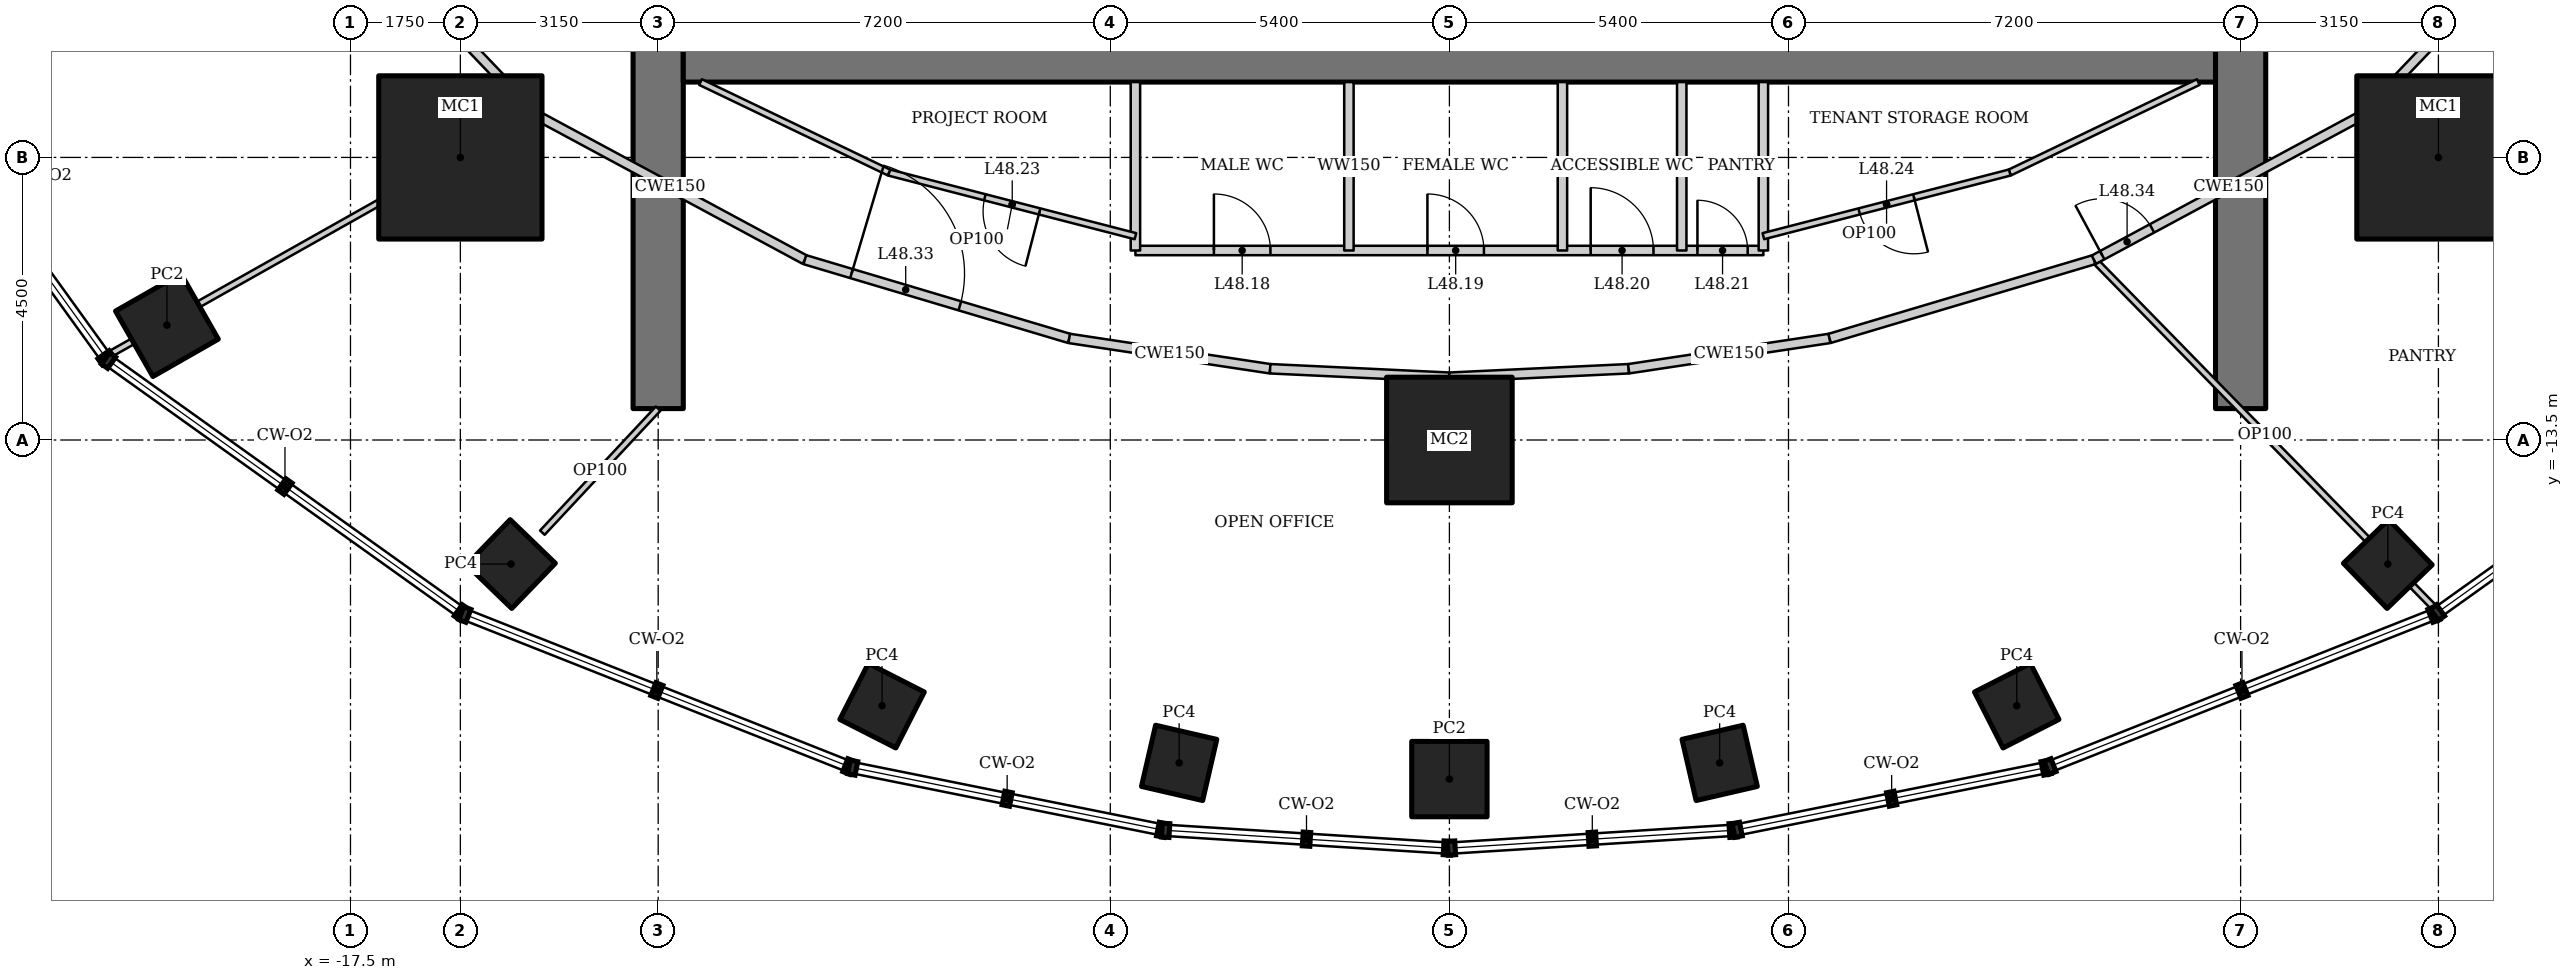
"""IFC4 building model, lengths in metres.
Left out: names, types, materials, properties, quantities, classifications, styles, units other than length and angle.
Written with IfcOpenShell. Run it as: python <this file> out.ifc"""

import sys

from ifc_helpers import new_model, si_unit, direction, frame, frame_2d, origin, origin_2d, place, context, subcontext, project, spatial, rectangle, hollow_rectangle, extrude, element, fill, save


model = new_model("IFC4")
c1 = context("Model", 3, precision=1e-05, world=origin(), true_north=direction((0.0, 1.0)))
c2 = subcontext(c1, "Body", "Model", "MODEL_VIEW")
j1 = project(units=[si_unit("LENGTHUNIT", "METRE"), si_unit("PLANEANGLEUNIT", "RADIAN")], contexts=[c1])
p1 = place(None, origin())
s1 = spatial("IfcSite", under=j1, at=p1, CompositionType="ELEMENT")
p2 = place(p1, origin())
s2 = spatial("IfcBuilding", under=s1, at=p2, CompositionType="ELEMENT")
p3 = place(p2, frame((0.0, 0.0, 207.4)))
s3 = spatial("IfcBuildingStorey", under=s2, at=p3, CompositionType="ELEMENT", Elevation=207.4)
p4 = place(p3, frame((-15.75, -9.0, 0.0), z_axis=(0.0, 0.0, 1.0), x_axis=(1.0, 0.0, 0.0)))
e1 = element("IfcColumn", 1, at=p4, inside=s3, PredefinedType="COLUMN", context=c2, shape_type="SweptSolid", body=[
    extrude(hollow_rectangle(XDim=2.6, YDim=2.6, WallThickness=0.13, at=origin_2d()), origin(), (0.0, 0.0, 1.0), 4.2),
])
p5 = place(p3, frame((0.0, -13.5, 0.0), z_axis=(0.0, 0.0, 1.0), x_axis=(1.0, 0.0, 0.0)))
e2 = element("IfcColumn", 2, at=p5, inside=s3, PredefinedType="COLUMN", context=c2, shape_type="SweptSolid", body=[
    extrude(hollow_rectangle(XDim=2.0, YDim=2.0, WallThickness=0.17, at=origin_2d()), origin(), (0.0, 0.0, 1.0), 4.2),
])
p6 = place(p3, frame((15.75, -9.0, 0.0), z_axis=(0.0, 0.0, 1.0), x_axis=(1.0, 0.0, 0.0)))
e3 = element("IfcColumn", 3, at=p6, inside=s3, PredefinedType="COLUMN", context=c2, shape_type="SweptSolid", body=[
    extrude(hollow_rectangle(XDim=2.6, YDim=2.6, WallThickness=0.13, at=origin_2d()), origin(), (0.0, 0.0, 1.0), 4.2),
])
p7 = place(p3, frame((-20.423, -11.67, 0.0), z_axis=(0.0, 0.0, 1.0), x_axis=(0.86824298017, 0.496139221777, 0.0)))
e4 = element("IfcColumn", 4, at=p7, inside=s3, PredefinedType="COLUMN", context=c2, shape_type="SweptSolid", body=[
    extrude(hollow_rectangle(XDim=1.2, YDim=1.2, WallThickness=0.1, at=origin_2d()), origin(), (0.0, 0.0, 1.0), 4.2),
])
for number, where, z_axis, x_axis in (
    (5, (-14.944, -15.475, 0.0), (0.0, 0.0, 1.0), (0.695, 0.719, 0.0)),
    (6, (-9.035, -17.731, 0.0), (0.0, 0.0, 1.0), (0.454, 0.891, 0.0)),
    (7, (-4.304, -18.642, 0.0), (0.0, 0.0, 1.0), (0.225, 0.974, 0.0)),
):
    element("IfcColumn", number, at=place(p3, frame(where, z_axis=z_axis, x_axis=x_axis)), inside=s3, PredefinedType="COLUMN", context=c2, shape_type="SweptSolid", body=[
        extrude(hollow_rectangle(XDim=1.0, YDim=1.0, WallThickness=0.08, at=origin_2d()), origin(), (0.0, 0.0, 1.0), 4.2),
    ])
p8 = place(p3, frame((0.0, -18.9, 0.0), z_axis=(0.0, 0.0, 1.0), x_axis=(1.0, 0.0, 0.0)))
e8 = element("IfcColumn", 8, at=p8, inside=s3, PredefinedType="COLUMN", context=c2, shape_type="SweptSolid", body=[
    extrude(hollow_rectangle(XDim=1.2, YDim=1.2, WallThickness=0.1, at=origin_2d()), origin(), (0.0, 0.0, 1.0), 4.2),
])
for number, where, z_axis, x_axis in (
    (9, (4.304, -18.642, 0.0), (0.0, 0.0, 1.0), (0.974, 0.225, 0.0)),
    (10, (9.035, -17.731, 0.0), (0.0, 0.0, 1.0), (0.891, 0.454, 0.0)),
    (11, (14.944, -15.475, 0.0), (0.0, 0.0, 1.0), (0.719, 0.695, 0.0)),
):
    element("IfcColumn", number, at=place(p3, frame(where, z_axis=z_axis, x_axis=x_axis)), inside=s3, PredefinedType="COLUMN", context=c2, shape_type="SweptSolid", body=[
        extrude(hollow_rectangle(XDim=1.0, YDim=1.0, WallThickness=0.08, at=origin_2d()), origin(), (0.0, 0.0, 1.0), 4.2),
    ])
p9 = place(p3, frame((12.6, -13.0, 0.0), z_axis=(0.0, 0.0, 1.0), x_axis=(0.0, 1.0, 0.0)))
e12 = element("IfcWall", 12, at=p9, inside=s3, PredefinedType="SHEAR", context=c2, shape_type="SweptSolid", body=[
    extrude(rectangle(XDim=26.0, YDim=0.8, at=frame_2d((13.0, 0.0))), origin(), (0.0, 0.0, 1.0), 4.2),
])
p10 = place(p9, frame((12.1, 0.0, 0.0)))
e13 = element("IfcOpeningElement", 13, at=p10, cuts=e12, PredefinedType="OPENING", context=c2, shape_type="SweptSolid", body=[
    extrude(rectangle(XDim=1.8, YDim=2.1, at=frame_2d((0.9, 1.05))), frame((0.0, 0.41, 0.0), z_axis=(0.0, -1.0, 0.0), x_axis=(1.0, 0.0, 0.0)), (0.0, 0.0, 1.0), 0.82),
])
p11 = place(p3, frame((-12.6, 13.0, 0.0), z_axis=(0.0, 0.0, 1.0), x_axis=(0.0, -1.0, 0.0)))
e14 = element("IfcWall", 14, at=p11, inside=s3, PredefinedType="SHEAR", context=c2, shape_type="SweptSolid", body=[
    extrude(rectangle(XDim=26.0, YDim=0.8, at=frame_2d((13.0, 0.0))), origin(), (0.0, 0.0, 1.0), 4.2),
])
p12 = place(p11, frame((12.1, 0.0, 0.0)))
e15 = element("IfcOpeningElement", 15, at=p12, cuts=e14, PredefinedType="OPENING", context=c2, shape_type="SweptSolid", body=[
    extrude(rectangle(XDim=1.8, YDim=2.1, at=frame_2d((0.9, 1.05))), frame((0.0, 0.41, 0.0), z_axis=(0.0, -1.0, 0.0), x_axis=(1.0, 0.0, 0.0)), (0.0, 0.0, 1.0), 0.82),
])
p13 = place(p3, frame((-12.2, -7.3, 0.0), z_axis=(0.0, 0.0, 1.0), x_axis=(1.0, 0.0, 0.0)))
e16 = element("IfcWall", 16, at=p13, inside=s3, PredefinedType="SHEAR", context=c2, shape_type="SweptSolid", body=[
    extrude(rectangle(XDim=24.4, YDim=1.0, at=frame_2d((12.2, 0.0))), origin(), (0.0, 0.0, 1.0), 4.2),
])
p14 = place(p3, frame((-21.358, -12.15, 0.0), z_axis=(0.0, 0.0, 1.0), x_axis=(0.871273053995, 0.490798599614, 0.0)))
e17 = element("IfcWall", 17, at=p14, inside=s3, PredefinedType="PARTITIONING", context=c2, shape_type="SweptSolid", body=[
    extrude(rectangle(XDim=7.807, YDim=0.1, at=frame_2d((3.904, 0.0))), origin(), (0.0, 0.0, 1.0), 3.524),
])
p15 = place(p3, frame((15.709, -16.199, 0.0), z_axis=(0.0, 0.0, 1.0), x_axis=(-0.699053895446, 0.715068983569, 0.0)))
e18 = element("IfcWall", 18, at=p15, inside=s3, PredefinedType="PARTITIONING", context=c2, shape_type="SweptSolid", body=[
    extrude(rectangle(XDim=7.79, YDim=0.1, at=frame_2d((3.895, 0.0))), origin(), (0.0, 0.0, 1.0), 3.41),
])
p16 = place(p3, frame((21.358, -12.15, 0.0), z_axis=(0.0, 0.0, 1.0), x_axis=(-0.871273053995, 0.490798599614, 0.0)))
e19 = element("IfcWall", 19, at=p16, inside=s3, PredefinedType="PARTITIONING", context=c2, shape_type="SweptSolid", body=[
    extrude(rectangle(XDim=7.807, YDim=0.1, at=frame_2d((3.904, 0.0))), origin(), (0.0, 0.0, 1.0), 3.522),
])
p17 = place(p3, frame((-18.174, -4.531, 0.0), z_axis=(0.0, 0.0, 1.0), x_axis=(0.690768413292, -0.723076067366, 0.0)))
e20 = element("IfcWall", 20, at=p17, inside=s3, PredefinedType="PARTITIONING", context=c2, shape_type="SweptSolid", body=[
    extrude(rectangle(XDim=5.237, YDim=0.15, at=frame_2d((2.618, 0.0))), origin(), (0.0, 0.0, 1.0), 4.05),
])
p18 = place(p17, frame((0.1, 0.0, 0.0)))
e21 = element("IfcOpeningElement", 21, at=p18, cuts=e20, PredefinedType="OPENING", context=c2, shape_type="SweptSolid", body=[
    extrude(rectangle(XDim=1.8, YDim=2.1, at=frame_2d((0.9, 1.05))), frame((0.0, 0.085, 0.0), z_axis=(0.0, -1.0, 0.0), x_axis=(1.0, 0.0, 0.0)), (0.0, 0.0, 1.0), 0.17),
])
p19 = place(p3, frame((-14.556, -8.318, 0.0), z_axis=(0.0, 0.0, 1.0), x_axis=(0.88053863253, -0.47397438393, 0.0)))
e22 = element("IfcWall", 22, at=p19, inside=s3, PredefinedType="PARTITIONING", context=c2, shape_type="SweptSolid", body=[
    extrude(rectangle(XDim=4.875, YDim=0.15, at=frame_2d((2.438, 0.0))), origin(), (0.0, 0.0, 1.0), 4.05),
])
p20 = place(p3, frame((-10.264, -10.628, 0.0), z_axis=(0.0, 0.0, 1.0), x_axis=(0.958384389306, -0.285480931648, 0.0)))
e23 = element("IfcWall", 23, at=p20, inside=s3, PredefinedType="PARTITIONING", context=c2, shape_type="SweptSolid", body=[
    extrude(rectangle(XDim=4.392, YDim=0.15, at=frame_2d((2.196, 0.0))), origin(), (0.0, 0.0, 1.0), 4.05),
])
p21 = place(p20, frame((0.775, 0.0, 0.0)))
e24 = element("IfcOpeningElement", 24, at=p21, cuts=e23, PredefinedType="OPENING", context=c2, shape_type="SweptSolid", body=[
    extrude(rectangle(XDim=1.8, YDim=2.1, at=frame_2d((0.9, 1.05))), frame((0.0, 0.085, 0.0), z_axis=(0.0, -1.0, 0.0), x_axis=(1.0, 0.0, 0.0)), (0.0, 0.0, 1.0), 0.17),
])
p22 = place(p3, frame((-6.054, -11.882, 0.0), z_axis=(0.0, 0.0, 1.0), x_axis=(0.988800347251, -0.149244340852, 0.0)))
e25 = element("IfcWall", 25, at=p22, inside=s3, PredefinedType="PARTITIONING", context=c2, shape_type="SweptSolid", body=[
    extrude(rectangle(XDim=3.236, YDim=0.15, at=frame_2d((1.618, 0.0))), origin(), (0.0, 0.0, 1.0), 4.05),
])
for number, where, z_axis, x_axis in (
    (26, (-2.855, -12.365, 0.0), (0.0, 0.0, 1.0), (0.999, -0.047, 0.0)),
    (27, (0.0, -12.5, 0.0), (0.0, 0.0, 1.0), (0.999, 0.047, 0.0)),
):
    element("IfcWall", number, at=place(p3, frame(where, z_axis=z_axis, x_axis=x_axis)), inside=s3, PredefinedType="PARTITIONING", context=c2, shape_type="SweptSolid", body=[
        extrude(rectangle(XDim=2.858, YDim=0.15, at=frame_2d((1.429, 0.0))), origin(), (0.0, 0.0, 1.0), 4.05),
    ])
p23 = place(p3, frame((2.855, -12.365, 0.0), z_axis=(0.0, 0.0, 1.0), x_axis=(0.988800347251, 0.149244340852, 0.0)))
e28 = element("IfcWall", 28, at=p23, inside=s3, PredefinedType="PARTITIONING", context=c2, shape_type="SweptSolid", body=[
    extrude(rectangle(XDim=3.236, YDim=0.15, at=frame_2d((1.618, 0.0))), origin(), (0.0, 0.0, 1.0), 4.05),
])
p24 = place(p3, frame((6.054, -11.882, 0.0), z_axis=(0.0, 0.0, 1.0), x_axis=(0.958384389306, 0.285480931648, 0.0)))
e29 = element("IfcWall", 29, at=p24, inside=s3, PredefinedType="PARTITIONING", context=c2, shape_type="SweptSolid", body=[
    extrude(rectangle(XDim=4.392, YDim=0.15, at=frame_2d((2.196, 0.0))), origin(), (0.0, 0.0, 1.0), 4.05),
])
p25 = place(p3, frame((10.264, -10.628, 0.0), z_axis=(0.0, 0.0, 1.0), x_axis=(0.88053863253, 0.47397438393, 0.0)))
e30 = element("IfcWall", 30, at=p25, inside=s3, PredefinedType="PARTITIONING", context=c2, shape_type="SweptSolid", body=[
    extrude(rectangle(XDim=4.875, YDim=0.15, at=frame_2d((2.438, 0.0))), origin(), (0.0, 0.0, 1.0), 4.05),
])
p26 = place(p25, frame((0.15, 0.0, 0.0)))
e31 = element("IfcOpeningElement", 31, at=p26, cuts=e30, PredefinedType="OPENING", context=c2, shape_type="SweptSolid", body=[
    extrude(rectangle(XDim=0.9, YDim=2.1, at=frame_2d((0.45, 1.05))), frame((0.0, 0.085, 0.0), z_axis=(0.0, -1.0, 0.0), x_axis=(1.0, 0.0, 0.0)), (0.0, 0.0, 1.0), 0.17),
])
p27 = place(p3, frame((14.556, -8.318, 0.0), z_axis=(0.0, 0.0, 1.0), x_axis=(0.690768413292, 0.723076067366, 0.0)))
e32 = element("IfcWall", 32, at=p27, inside=s3, PredefinedType="PARTITIONING", context=c2, shape_type="SweptSolid", body=[
    extrude(rectangle(XDim=5.237, YDim=0.15, at=frame_2d((2.618, 0.0))), origin(), (0.0, 0.0, 1.0), 4.05),
])
p28 = place(p27, frame((4.187, 0.0, 0.0)))
e33 = element("IfcOpeningElement", 33, at=p28, cuts=e32, PredefinedType="OPENING", context=c2, shape_type="SweptSolid", body=[
    extrude(rectangle(XDim=0.9, YDim=2.1, at=frame_2d((0.45, 1.05))), frame((0.0, 0.085, 0.0), z_axis=(0.0, -1.0, 0.0), x_axis=(1.0, 0.0, 0.0)), (0.0, 0.0, 1.0), 0.17),
])
p29 = place(p3, frame((-5.0, -10.482, 0.0), z_axis=(0.0, 0.0, 1.0), x_axis=(1.0, 0.0, 0.0)))
e34 = element("IfcWall", 34, at=p29, inside=s3, PredefinedType="SOLIDWALL", context=c2, shape_type="SweptSolid", body=[
    extrude(rectangle(XDim=10.0, YDim=0.15, at=frame_2d((5.0, 0.0))), origin(), (0.0, 0.0, 1.0), 4.05),
])
p30 = place(p29, frame((1.25, 0.0, 0.0)))
e35 = element("IfcOpeningElement", 35, at=p30, cuts=e34, PredefinedType="OPENING", context=c2, shape_type="SweptSolid", body=[
    extrude(rectangle(XDim=0.9, YDim=2.1, at=frame_2d((0.45, 1.05))), frame((0.0, 0.085, 0.0), z_axis=(0.0, -1.0, 0.0), x_axis=(1.0, 0.0, 0.0)), (0.0, 0.0, 1.0), 0.17),
])
p31 = place(p29, frame((4.65, 0.0, 0.0)))
e36 = element("IfcOpeningElement", 36, at=p31, cuts=e34, PredefinedType="OPENING", context=c2, shape_type="SweptSolid", body=[
    extrude(rectangle(XDim=0.9, YDim=2.1, at=frame_2d((0.45, 1.05))), frame((0.0, 0.085, 0.0), z_axis=(0.0, -1.0, 0.0), x_axis=(1.0, 0.0, 0.0)), (0.0, 0.0, 1.0), 0.17),
])
p32 = place(p29, frame((7.25, 0.0, 0.0)))
e37 = element("IfcOpeningElement", 37, at=p32, cuts=e34, PredefinedType="OPENING", context=c2, shape_type="SweptSolid", body=[
    extrude(rectangle(XDim=1.0, YDim=2.1, at=frame_2d((0.5, 1.05))), frame((0.0, 0.085, 0.0), z_axis=(0.0, -1.0, 0.0), x_axis=(1.0, 0.0, 0.0)), (0.0, 0.0, 1.0), 0.17),
])
p33 = place(p29, frame((8.95, 0.0, 0.0)))
e38 = element("IfcOpeningElement", 38, at=p33, cuts=e34, PredefinedType="OPENING", context=c2, shape_type="SweptSolid", body=[
    extrude(rectangle(XDim=0.8, YDim=2.1, at=frame_2d((0.4, 1.05))), frame((0.0, 0.085, 0.0), z_axis=(0.0, -1.0, 0.0), x_axis=(1.0, 0.0, 0.0)), (0.0, 0.0, 1.0), 0.17),
])
for number, where, z_axis, x_axis in (
    (39, (-5.0, -7.8, 0.0), (0.0, 0.0, 1.0), (0.0, -1.0, 0.0)),
    (40, (5.0, -7.8, 0.0), (0.0, 0.0, 1.0), (0.0, -1.0, 0.0)),
    (41, (-1.6, -7.8, 0.0), (0.0, 0.0, 1.0), (0.0, -1.0, 0.0)),
):
    element("IfcWall", number, at=place(p3, frame(where, z_axis=z_axis, x_axis=x_axis)), inside=s3, PredefinedType="SOLIDWALL", context=c2, shape_type="SweptSolid", body=[
        extrude(rectangle(XDim=2.682, YDim=0.15, at=frame_2d((1.341, 0.0))), origin(), (0.0, 0.0, 1.0), 4.05),
    ])
p34 = place(p3, frame((1.8, -7.8, 0.0), z_axis=(0.0, 0.0, 1.0), x_axis=(0.0, -1.0, 0.0)))
e42 = element("IfcWall", 42, at=p34, inside=s3, PredefinedType="SOLIDWALL", context=c2, shape_type="SweptSolid", body=[
    extrude(rectangle(XDim=2.682, YDim=0.15, at=frame_2d((1.341, 0.0))), origin(), (0.0, 0.0, 1.0), 3.293),
])
p35 = place(p3, frame((3.7, -7.8, 0.0), z_axis=(0.0, 0.0, 1.0), x_axis=(0.0, -1.0, 0.0)))
e43 = element("IfcWall", 43, at=p35, inside=s3, PredefinedType="SOLIDWALL", context=c2, shape_type="SweptSolid", body=[
    extrude(rectangle(XDim=2.682, YDim=0.15, at=frame_2d((1.341, 0.0))), origin(), (0.0, 0.0, 1.0), 4.05),
])
p36 = place(p3, frame((-5.0, -10.254, 0.0), z_axis=(0.0, 0.0, 1.0), x_axis=(-0.968224167198, 0.250083910027, 0.0)))
e44 = element("IfcWall", 44, at=p36, inside=s3, PredefinedType="PARTITIONING", context=c2, shape_type="SweptSolid", body=[
    extrude(rectangle(XDim=4.052, YDim=0.1, at=frame_2d((2.026, 0.0))), origin(), (0.0, 0.0, 1.0), 4.05),
])
p37 = place(p36, frame((1.576, 0.0, 0.0)))
e45 = element("IfcOpeningElement", 45, at=p37, cuts=e44, PredefinedType="OPENING", context=c2, shape_type="SweptSolid", body=[
    extrude(rectangle(XDim=0.9, YDim=2.1, at=frame_2d((0.45, 1.05))), frame((0.0, 0.06, 0.0), z_axis=(0.0, -1.0, 0.0), x_axis=(1.0, 0.0, 0.0)), (0.0, 0.0, 1.0), 0.12),
])
for number, where, z_axis, x_axis in (
    (46, (-8.924, -9.241, 0.0), (0.0, 0.0, 1.0), (-0.902, 0.433, 0.0)),
    (47, (11.926, -7.8, 0.0), (0.0, 0.0, 1.0), (-0.902, -0.433, 0.0)),
):
    element("IfcWall", number, at=place(p3, frame(where, z_axis=z_axis, x_axis=x_axis)), inside=s3, PredefinedType="PARTITIONING", context=c2, shape_type="SweptSolid", body=[
        extrude(rectangle(XDim=3.33, YDim=0.1, at=frame_2d((1.665, 0.0))), origin(), (0.0, 0.0, 1.0), 4.05),
    ])
p38 = place(p3, frame((8.924, -9.241, 0.0), z_axis=(0.0, 0.0, 1.0), x_axis=(-0.968224167198, -0.250083910027, 0.0)))
e48 = element("IfcWall", 48, at=p38, inside=s3, PredefinedType="PARTITIONING", context=c2, shape_type="SweptSolid", body=[
    extrude(rectangle(XDim=4.052, YDim=0.1, at=frame_2d((2.026, 0.0))), origin(), (0.0, 0.0, 1.0), 4.05),
])
p39 = place(p38, frame((1.576, 0.0, 0.0)))
e49 = element("IfcOpeningElement", 49, at=p39, cuts=e48, PredefinedType="OPENING", context=c2, shape_type="SweptSolid", body=[
    extrude(rectangle(XDim=0.9, YDim=2.1, at=frame_2d((0.45, 1.05))), frame((0.0, 0.06, 0.0), z_axis=(0.0, -1.0, 0.0), x_axis=(1.0, 0.0, 0.0)), (0.0, 0.0, 1.0), 0.12),
])
p40 = place(p3, frame((-12.6, -13.0, 0.0), z_axis=(0.0, 0.0, 1.0), x_axis=(-0.682434118301, -0.730947107648, 0.0)))
e50 = element("IfcWall", 50, at=p40, inside=s3, PredefinedType="PARTITIONING", context=c2, shape_type="SweptSolid", body=[
    extrude(rectangle(XDim=2.702, YDim=0.1, at=frame_2d((1.351, 0.0))), origin(), (0.0, 0.0, 1.0), 3.41),
])
p41 = place(p30, origin())
e51 = element("IfcDoor", 51, at=p41, inside=s3, OperationType="SINGLE_SWING_LEFT", PredefinedType="DOOR", context=c2, shape_type="SweptSolid", body=[
    extrude(rectangle(XDim=0.9, YDim=2.1, at=frame_2d((0.45, 1.05))), frame((0.0, 0.025, 0.0), z_axis=(0.0, -1.0, 0.0), x_axis=(1.0, 0.0, 0.0)), (0.0, 0.0, 1.0), 0.05),
])
fill(e35, e51)
p42 = place(p31, origin())
e52 = element("IfcDoor", 52, at=p42, inside=s3, OperationType="SINGLE_SWING_LEFT", PredefinedType="DOOR", context=c2, shape_type="SweptSolid", body=[
    extrude(rectangle(XDim=0.9, YDim=2.1, at=frame_2d((0.45, 1.05))), frame((0.0, 0.025, 0.0), z_axis=(0.0, -1.0, 0.0), x_axis=(1.0, 0.0, 0.0)), (0.0, 0.0, 1.0), 0.05),
])
fill(e36, e52)
p43 = place(p32, origin())
e53 = element("IfcDoor", 53, at=p43, inside=s3, OperationType="SINGLE_SWING_LEFT", PredefinedType="DOOR", context=c2, shape_type="SweptSolid", body=[
    extrude(rectangle(XDim=1.0, YDim=2.1, at=frame_2d((0.5, 1.05))), frame((0.0, 0.025, 0.0), z_axis=(0.0, -1.0, 0.0), x_axis=(1.0, 0.0, 0.0)), (0.0, 0.0, 1.0), 0.05),
])
fill(e37, e53)
p44 = place(p33, origin())
e54 = element("IfcDoor", 54, at=p44, inside=s3, OperationType="SINGLE_SWING_LEFT", PredefinedType="DOOR", context=c2, shape_type="SweptSolid", body=[
    extrude(rectangle(XDim=0.8, YDim=2.1, at=frame_2d((0.4, 1.05))), frame((0.0, 0.025, 0.0), z_axis=(0.0, -1.0, 0.0), x_axis=(1.0, 0.0, 0.0)), (0.0, 0.0, 1.0), 0.05),
])
fill(e38, e54)
p45 = place(p37, origin())
e55 = element("IfcDoor", 55, at=p45, inside=s3, OperationType="SINGLE_SWING_LEFT", PredefinedType="DOOR", context=c2, shape_type="SweptSolid", body=[
    extrude(rectangle(XDim=0.9, YDim=2.1, at=frame_2d((0.45, 1.05))), frame((0.0, 0.025, 0.0), z_axis=(0.0, -1.0, 0.0), x_axis=(1.0, 0.0, 0.0)), (0.0, 0.0, 1.0), 0.05),
])
fill(e45, e55)
p46 = place(p39, origin())
e56 = element("IfcDoor", 56, at=p46, inside=s3, OperationType="SINGLE_SWING_LEFT", PredefinedType="DOOR", context=c2, shape_type="SweptSolid", body=[
    extrude(rectangle(XDim=0.9, YDim=2.1, at=frame_2d((0.45, 1.05))), frame((0.0, 0.025, 0.0), z_axis=(0.0, -1.0, 0.0), x_axis=(1.0, 0.0, 0.0)), (0.0, 0.0, 1.0), 0.05),
])
fill(e49, e56)
p47 = place(p21, origin())
e57 = element("IfcDoor", 57, at=p47, inside=s3, OperationType="DOUBLE_DOOR_DOUBLE_SWING", PredefinedType="DOOR", context=c2, shape_type="SweptSolid", body=[
    extrude(rectangle(XDim=1.8, YDim=2.1, at=frame_2d((0.9, 1.05))), frame((0.0, 0.025, 0.0), z_axis=(0.0, -1.0, 0.0), x_axis=(1.0, 0.0, 0.0)), (0.0, 0.0, 1.0), 0.05),
])
fill(e24, e57)
p48 = place(p26, origin())
e58 = element("IfcDoor", 58, at=p48, inside=s3, OperationType="SINGLE_SWING_LEFT", PredefinedType="DOOR", context=c2, shape_type="SweptSolid", body=[
    extrude(rectangle(XDim=0.9, YDim=2.1, at=frame_2d((0.45, 1.05))), frame((0.0, 0.025, 0.0), z_axis=(0.0, -1.0, 0.0), x_axis=(1.0, 0.0, 0.0)), (0.0, 0.0, 1.0), 0.05),
])
fill(e31, e58)
save(model, sys.argv[1])
